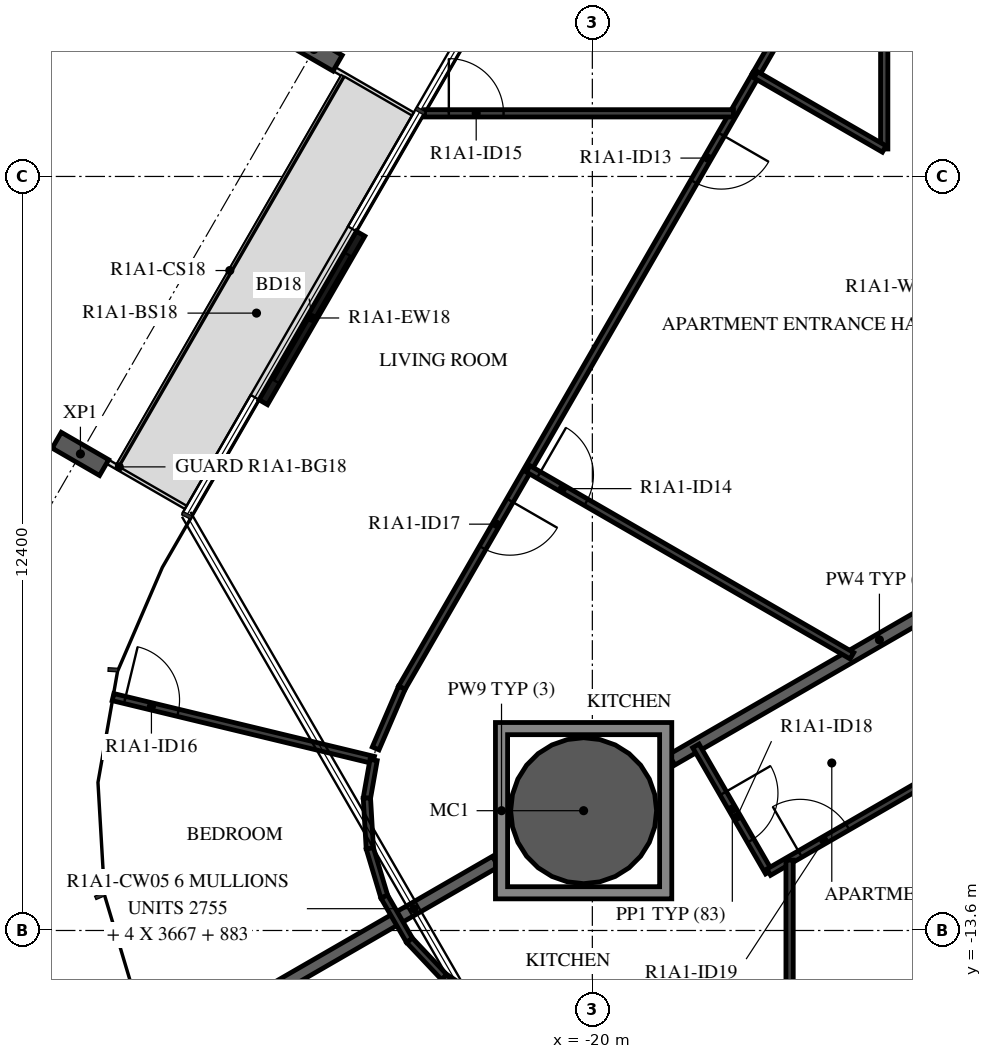
"""IFC4 building model, lengths in metres.
Left out: names, types, materials, properties, quantities, classifications, styles, units other than length and angle.
Written with IfcOpenShell. Run it as: python <this file> out.ifc"""

import sys

from ifc_helpers import new_model, si_unit, direction, frame, frame_2d, origin, origin_2d, place, context, subcontext, project, spatial, polyline, rectangle, hollow_circle, i_section, outline, extrude, element, fill, save


model = new_model("IFC4")
c1 = context("Model", 3, precision=1e-05, world=origin(), true_north=direction((0.0, 1.0)))
c2 = subcontext(c1, "Body", "Model", "MODEL_VIEW")
j1 = project(units=[si_unit("LENGTHUNIT", "METRE"), si_unit("PLANEANGLEUNIT", "RADIAN")], contexts=[c1])
p1 = place(None, origin())
s1 = spatial("IfcSite", under=j1, at=p1, CompositionType="ELEMENT")
p2 = place(p1, origin())
s2 = spatial("IfcBuilding", under=s1, at=p2, CompositionType="ELEMENT")
p3 = place(p2, frame((0.0, 0.0, 41.9)))
s3 = spatial("IfcBuildingStorey", under=s2, at=p3, CompositionType="ELEMENT", Elevation=41.9)
p4 = place(p3, frame((-20.144, -11.63, -0.38), z_axis=(0.0, 0.0, 1.0), x_axis=(1.0, 0.0, 0.0)))
e1 = element("IfcColumn", 1, at=p4, inside=s3, PredefinedType="COLUMN", context=c2, shape_type="SweptSolid", body=[
    extrude(hollow_circle(Radius=1.2, WallThickness=0.06, at=origin_2d()), origin(), (0.0, 0.0, 1.0), 3.5),
])
for number, where, z_axis, x_axis in (
    (2, (-24.579, 0.888, -0.38), (0.0, 0.0, 1.0), (0.5, 0.866, 0.0)),
    (3, (-28.419, -5.763, -0.38), (0.0, 0.0, 1.0), (0.5, 0.866, 0.0)),
):
    element("IfcColumn", number, at=place(p3, frame(where, z_axis=z_axis, x_axis=x_axis)), inside=s3, PredefinedType="COLUMN", context=c2, shape_type="SweptSolid", body=[
        extrude(i_section(OverallWidth=0.3, OverallDepth=0.9, WebThickness=0.019, FlangeThickness=0.035, FilletRadius=0.03, at=origin_2d()), origin(), (0.0, 0.0, 1.0), 3.5),
    ])
p5 = place(p3, frame((-23.811, -2.142, 0.0), z_axis=(0.0, 0.0, 1.0), x_axis=(-0.500028443584, -0.866008981251, 0.0)))
e4 = element("IfcWall", 4, at=p5, inside=s3, PredefinedType="STANDARD", context=c2, shape_type="SweptSolid", body=[
    extrude(rectangle(XDim=3.2, YDim=0.16, at=frame_2d((1.6, 0.0))), origin(), (0.0, 0.0, 1.0), 3.12),
])
p6 = place(p5, frame((0.4, 0.0, 0.0)))
e5 = element("IfcOpeningElement", 5, at=p6, cuts=e4, PredefinedType="OPENING", context=c2, shape_type="SweptSolid", body=[
    extrude(rectangle(XDim=2.4, YDim=2.4, at=frame_2d((1.2, 1.2))), frame((0.0, 0.09, 0.0), z_axis=(0.0, -1.0, 0.0), x_axis=(1.0, 0.0, 0.0)), (0.0, 0.0, 1.0), 0.18),
])
p7 = place(p3, frame((-18.694, -10.793, 0.0), z_axis=(0.0, 0.0, 1.0), x_axis=(0.86603400694, 0.499985098601, 0.0)))
e6 = element("IfcWall", 6, at=p7, inside=s3, PredefinedType="STANDARD", context=c2, shape_type="SweptSolid", body=[
    extrude(rectangle(XDim=7.885, YDim=0.2, at=frame_2d((3.943, 0.0))), origin(), (0.0, 0.0, 1.0), 3.12),
])
p8 = place(p3, frame((-27.025, -15.603, 0.0), z_axis=(0.0, 0.0, 1.0), x_axis=(0.866030653443, 0.499990907215, 0.0)))
e7 = element("IfcWall", 7, at=p8, inside=s3, PredefinedType="STANDARD", context=c2, shape_type="SweptSolid", body=[
    extrude(rectangle(XDim=6.271, YDim=0.2, at=frame_2d((3.136, 0.0))), origin(), (0.0, 0.0, 1.0), 3.12),
])
p9 = place(p3, frame((-13.572, 6.953, 0.0), z_axis=(0.0, 0.0, 1.0), x_axis=(-0.499981332661, -0.866036181109, 0.0)))
e8 = element("IfcWall", 8, at=p9, inside=s3, PredefinedType="PARTITIONING", context=c2, shape_type="SweptSolid", body=[
    extrude(rectangle(XDim=7.483, YDim=0.12, at=frame_2d((3.742, 0.0))), origin(), (0.0, 0.0, 1.0), 3.12),
])
p10 = place(p3, frame((-17.313, 0.472, 0.0), z_axis=(0.0, 0.0, 1.0), x_axis=(-0.499999047218, -0.866025953873, 0.0)))
e9 = element("IfcWall", 9, at=p10, inside=s3, PredefinedType="PARTITIONING", context=c2, shape_type="SweptSolid", body=[
    extrude(rectangle(XDim=11.639, YDim=0.12, at=frame_2d((5.82, 0.0))), origin(), (0.0, 0.0, 1.0), 3.12),
])
p11 = place(p10, frame((1.132, 0.0, 0.0)))
e10 = element("IfcOpeningElement", 10, at=p11, cuts=e9, PredefinedType="OPENING", context=c2, shape_type="SweptSolid", body=[
    extrude(rectangle(XDim=0.9, YDim=2.1, at=frame_2d((0.45, 1.05))), frame((0.0, 0.07, 0.0), z_axis=(0.0, -1.0, 0.0), x_axis=(1.0, 0.0, 0.0)), (0.0, 0.0, 1.0), 0.14),
])
p12 = place(p10, frame((8.083, 0.0, 0.0)))
e11 = element("IfcOpeningElement", 11, at=p12, cuts=e9, PredefinedType="OPENING", context=c2, shape_type="SweptSolid", body=[
    extrude(rectangle(XDim=0.9, YDim=2.1, at=frame_2d((0.45, 1.05))), frame((0.0, 0.07, 0.0), z_axis=(0.0, -1.0, 0.0), x_axis=(1.0, 0.0, 0.0)), (0.0, 0.0, 1.0), 0.14),
])
p13 = place(p3, frame((-15.2, 4.073, 0.0), z_axis=(0.0, 0.0, 1.0), x_axis=(0.0, -1.0, 0.0)))
e12 = element("IfcWall", 12, at=p13, inside=s3, PredefinedType="PARTITIONING", context=c2, shape_type="SweptSolid", body=[
    extrude(rectangle(XDim=4.821, YDim=0.12, at=frame_2d((2.411, 0.0))), origin(), (0.0, 0.0, 1.0), 3.12),
])
p14 = place(p13, frame((1.4, 0.0, 0.0)))
e13 = element("IfcOpeningElement", 13, at=p14, cuts=e12, PredefinedType="OPENING", context=c2, shape_type="SweptSolid", body=[
    extrude(rectangle(XDim=0.8, YDim=2.1, at=frame_2d((0.4, 1.05))), frame((0.0, 0.07, 0.0), z_axis=(0.0, -1.0, 0.0), x_axis=(1.0, 0.0, 0.0)), (0.0, 0.0, 1.0), 0.14),
])
p15 = place(p3, frame((-15.2, -0.748, 0.0), z_axis=(0.0, 0.0, 1.0), x_axis=(-0.866030657337, 0.49999090047, 0.0)))
e14 = element("IfcWall", 14, at=p15, inside=s3, PredefinedType="PARTITIONING", context=c2, shape_type="SweptSolid", body=[
    extrude(rectangle(XDim=2.44, YDim=0.12, at=frame_2d((1.22, 0.0))), origin(), (0.0, 0.0, 1.0), 3.12),
])
p16 = place(p3, frame((-21.055, -6.009, 0.0), z_axis=(0.0, 0.0, 1.0), x_axis=(0.866030172657, -0.49999173998, 0.0)))
e15 = element("IfcWall", 15, at=p16, inside=s3, PredefinedType="PARTITIONING", context=c2, shape_type="SweptSolid", body=[
    extrude(rectangle(XDim=6.147, YDim=0.12, at=frame_2d((3.074, 0.0))), origin(), (0.0, 0.0, 1.0), 3.12),
])
p17 = place(p16, frame((0.2, 0.0, 0.0)))
e16 = element("IfcOpeningElement", 16, at=p17, cuts=e15, PredefinedType="OPENING", context=c2, shape_type="SweptSolid", body=[
    extrude(rectangle(XDim=0.9, YDim=2.1, at=frame_2d((0.45, 1.05))), frame((0.0, 0.07, 0.0), z_axis=(0.0, -1.0, 0.0), x_axis=(1.0, 0.0, 0.0)), (0.0, 0.0, 1.0), 0.14),
])
p18 = place(p3, frame((-22.76, -0.162, 0.0), z_axis=(0.0, 0.0, 1.0), x_axis=(1.0, 0.0, 0.0)))
e17 = element("IfcWall", 17, at=p18, inside=s3, PredefinedType="PARTITIONING", context=c2, shape_type="SweptSolid", body=[
    extrude(rectangle(XDim=5.081, YDim=0.12, at=frame_2d((2.54, 0.0))), origin(), (0.0, 0.0, 1.0), 3.12),
])
p19 = place(p18, frame((0.4, 0.0, 0.0)))
e18 = element("IfcOpeningElement", 18, at=p19, cuts=e17, PredefinedType="OPENING", context=c2, shape_type="SweptSolid", body=[
    extrude(rectangle(XDim=0.9, YDim=2.1, at=frame_2d((0.45, 1.05))), frame((0.0, 0.07, 0.0), z_axis=(0.0, -1.0, 0.0), x_axis=(1.0, 0.0, 0.0)), (0.0, 0.0, 1.0), 0.14),
])
p20 = place(p3, frame((-23.564, -10.606, 0.0), z_axis=(0.0, 0.0, 1.0), x_axis=(0.396195073027, 0.918166359713, 0.0)))
e19 = element("IfcWall", 19, at=p20, inside=s3, PredefinedType="PARTITIONING", context=c2, shape_type="SweptSolid", body=[
    extrude(rectangle(XDim=1.087, YDim=0.12, at=frame_2d((0.543, 0.0))), origin(), (0.0, 0.0, 1.0), 3.12),
])
p21 = place(p3, frame((-27.883, -9.762, 0.0), z_axis=(0.0, 0.0, 1.0), x_axis=(0.972097015458, -0.234579181809, 0.0)))
e20 = element("IfcWall", 20, at=p21, inside=s3, PredefinedType="PARTITIONING", context=c2, shape_type="SweptSolid", body=[
    extrude(rectangle(XDim=4.409, YDim=0.12, at=frame_2d((2.204, 0.0))), origin(), (0.0, 0.0, 1.0), 3.12),
])
p22 = place(p21, frame((0.2, 0.0, 0.0)))
e21 = element("IfcOpeningElement", 21, at=p22, cuts=e20, PredefinedType="OPENING", context=c2, shape_type="SweptSolid", body=[
    extrude(rectangle(XDim=0.9, YDim=2.1, at=frame_2d((0.45, 1.05))), frame((0.0, 0.07, 0.0), z_axis=(0.0, -1.0, 0.0), x_axis=(1.0, 0.0, 0.0)), (0.0, 0.0, 1.0), 0.14),
])
p23 = place(p3, frame((-23.597, -10.796, 0.0), z_axis=(0.0, 0.0, 1.0), x_axis=(-0.173610040386, -0.984814476882, 0.0)))
e22 = element("IfcWall", 22, at=p23, inside=s3, PredefinedType="PARTITIONING", context=c2, shape_type="SweptSolid", body=[
    extrude(rectangle(XDim=0.636, YDim=0.12, at=frame_2d((0.318, 0.0))), origin(), (0.0, 0.0, 1.0), 3.12),
])
p24 = place(p3, frame((-23.708, -11.422, 0.0), z_axis=(0.0, 0.0, 1.0), x_axis=(0.058031280246, -0.998314765248, 0.0)))
e23 = element("IfcWall", 23, at=p24, inside=s3, PredefinedType="PARTITIONING", context=c2, shape_type="SweptSolid", body=[
    extrude(rectangle(XDim=0.829, YDim=0.12, at=frame_2d((0.415, 0.0))), origin(), (0.0, 0.0, 1.0), 3.12),
])
for number, where, z_axis, x_axis in (
    (24, (-23.659, -12.25, 0.0), (0.0, 0.0, 1.0), (0.287, -0.958, 0.0)),
    (25, (-23.422, -13.044, 0.0), (0.0, 0.0, 1.0), (0.5, -0.866, 0.0)),
):
    element("IfcWall", number, at=place(p3, frame(where, z_axis=z_axis, x_axis=x_axis)), inside=s3, PredefinedType="PARTITIONING", context=c2, shape_type="SweptSolid", body=[
        extrude(rectangle(XDim=0.829, YDim=0.12, at=frame_2d((0.415, 0.0))), origin(), (0.0, 0.0, 1.0), 3.12),
    ])
p25 = place(p3, frame((-18.298, -10.564, 0.0), z_axis=(0.0, 0.0, 1.0), x_axis=(0.500048565365, -0.865997362742, 0.0)))
e26 = element("IfcWall", 26, at=p25, inside=s3, PredefinedType="PARTITIONING", context=c2, shape_type="SweptSolid", body=[
    extrude(rectangle(XDim=2.398, YDim=0.12, at=frame_2d((1.199, 0.0))), origin(), (0.0, 0.0, 1.0), 3.12),
])
p26 = place(p25, frame((0.9, 0.0, 0.0)))
e27 = element("IfcOpeningElement", 27, at=p26, cuts=e26, PredefinedType="OPENING", context=c2, shape_type="SweptSolid", body=[
    extrude(rectangle(XDim=0.9, YDim=2.1, at=frame_2d((0.45, 1.05))), frame((0.0, 0.07, 0.0), z_axis=(0.0, -1.0, 0.0), x_axis=(1.0, 0.0, 0.0)), (0.0, 0.0, 1.0), 0.14),
])
p27 = place(p3, frame((-17.099, -12.641, 0.0), z_axis=(0.0, 0.0, 1.0), x_axis=(0.866027165828, 0.499996948039, 0.0)))
e28 = element("IfcWall", 28, at=p27, inside=s3, PredefinedType="PARTITIONING", context=c2, shape_type="SweptSolid", body=[
    extrude(rectangle(XDim=5.928, YDim=0.12, at=frame_2d((2.964, 0.0))), origin(), (0.0, 0.0, 1.0), 3.12),
])
p28 = place(p27, frame((0.595, 0.0, 0.0)))
e29 = element("IfcOpeningElement", 29, at=p28, cuts=e28, PredefinedType="OPENING", context=c2, shape_type="SweptSolid", body=[
    extrude(rectangle(XDim=0.9, YDim=2.1, at=frame_2d((0.45, 1.05))), frame((0.0, 0.07, 0.0), z_axis=(0.0, -1.0, 0.0), x_axis=(1.0, 0.0, 0.0)), (0.0, 0.0, 1.0), 0.14),
])
p29 = place(p3, frame((-21.746, -14.82, 0.0), z_axis=(0.0, 0.0, 1.0), x_axis=(-0.835477570013, 0.549524549046, 0.0)))
e30 = element("IfcWall", 30, at=p29, inside=s3, PredefinedType="PARTITIONING", context=c2, shape_type="SweptSolid", body=[
    extrude(rectangle(XDim=0.829, YDim=0.12, at=frame_2d((0.415, 0.0))), origin(), (0.0, 0.0, 1.0), 3.12),
])
p30 = place(p3, frame((-22.438, -14.365, 0.0), z_axis=(0.0, 0.0, 1.0), x_axis=(-0.686182189596, 0.727429723535, 0.0)))
e31 = element("IfcWall", 31, at=p30, inside=s3, PredefinedType="PARTITIONING", context=c2, shape_type="SweptSolid", body=[
    extrude(rectangle(XDim=0.829, YDim=0.12, at=frame_2d((0.414, 0.0))), origin(), (0.0, 0.0, 1.0), 3.12),
])
p31 = place(p3, frame((-16.756, -15.23, 0.0), z_axis=(0.0, 0.0, 1.0), x_axis=(0.0, 1.0, 0.0)))
e32 = element("IfcWall", 32, at=p31, inside=s3, PredefinedType="PARTITIONING", context=c2, shape_type="SweptSolid", body=[
    extrude(rectangle(XDim=2.787, YDim=0.12, at=frame_2d((1.394, 0.0))), origin(), (0.0, 0.0, 1.0), 3.12),
])
p32 = place(p3, origin())
e33 = element("IfcWall", 33, at=p32, inside=s3, PredefinedType="STANDARD", context=c2, shape_type="SweptSolid", body=[
    extrude(outline(polyline([(-18.694, -10.18), (-18.694, -13.08), (-21.594, -13.08), (-21.594, -10.18), (-18.694, -10.18)]), holes=[polyline([(-21.394, -12.88), (-18.894, -12.88), (-18.894, -10.38), (-21.394, -10.38), (-21.394, -12.88)])]), origin(), (0.0, 0.0, 1.0), 3.12),
])
p33 = place(p6, origin())
e34 = element("IfcDoor", 34, at=p33, inside=s3, OperationType="DOUBLE_DOOR_SLIDING", PredefinedType="DOOR", context=c2, shape_type="SweptSolid", body=[
    extrude(rectangle(XDim=2.4, YDim=2.4, at=frame_2d((1.2, 1.2))), frame((0.0, 0.025, 0.0), z_axis=(0.0, -1.0, 0.0), x_axis=(1.0, 0.0, 0.0)), (0.0, 0.0, 1.0), 0.05),
])
fill(e5, e34)
p34 = place(p11, origin())
e35 = element("IfcDoor", 35, at=p34, inside=s3, OperationType="SINGLE_SWING_RIGHT", PredefinedType="DOOR", context=c2, shape_type="SweptSolid", body=[
    extrude(rectangle(XDim=0.9, YDim=2.1, at=frame_2d((0.45, 1.05))), frame((0.0, 0.025, 0.0), z_axis=(0.0, -1.0, 0.0), x_axis=(1.0, 0.0, 0.0)), (0.0, 0.0, 1.0), 0.05),
])
fill(e10, e35)
p35 = place(p17, origin())
e36 = element("IfcDoor", 36, at=p35, inside=s3, OperationType="SINGLE_SWING_RIGHT", PredefinedType="DOOR", context=c2, shape_type="SweptSolid", body=[
    extrude(rectangle(XDim=0.9, YDim=2.1, at=frame_2d((0.45, 1.05))), frame((0.0, 0.025, 0.0), z_axis=(0.0, -1.0, 0.0), x_axis=(1.0, 0.0, 0.0)), (0.0, 0.0, 1.0), 0.05),
])
fill(e16, e36)
p36 = place(p19, origin())
e37 = element("IfcDoor", 37, at=p36, inside=s3, OperationType="SINGLE_SWING_LEFT", PredefinedType="DOOR", context=c2, shape_type="SweptSolid", body=[
    extrude(rectangle(XDim=0.9, YDim=2.1, at=frame_2d((0.45, 1.05))), frame((0.0, 0.025, 0.0), z_axis=(0.0, -1.0, 0.0), x_axis=(1.0, 0.0, 0.0)), (0.0, 0.0, 1.0), 0.05),
])
fill(e18, e37)
p37 = place(p22, origin())
e38 = element("IfcDoor", 38, at=p37, inside=s3, OperationType="SINGLE_SWING_RIGHT", PredefinedType="DOOR", context=c2, shape_type="SweptSolid", body=[
    extrude(rectangle(XDim=0.9, YDim=2.1, at=frame_2d((0.45, 1.05))), frame((0.0, 0.025, 0.0), z_axis=(0.0, -1.0, 0.0), x_axis=(1.0, 0.0, 0.0)), (0.0, 0.0, 1.0), 0.05),
])
fill(e21, e38)
p38 = place(p12, origin())
e39 = element("IfcDoor", 39, at=p38, inside=s3, OperationType="SINGLE_SWING_LEFT", PredefinedType="DOOR", context=c2, shape_type="SweptSolid", body=[
    extrude(rectangle(XDim=0.9, YDim=2.1, at=frame_2d((0.45, 1.05))), frame((0.0, 0.025, 0.0), z_axis=(0.0, -1.0, 0.0), x_axis=(1.0, 0.0, 0.0)), (0.0, 0.0, 1.0), 0.05),
])
fill(e11, e39)
p39 = place(p26, origin())
e40 = element("IfcDoor", 40, at=p39, inside=s3, OperationType="SINGLE_SWING_LEFT", PredefinedType="DOOR", context=c2, shape_type="SweptSolid", body=[
    extrude(rectangle(XDim=0.9, YDim=2.1, at=frame_2d((0.45, 1.05))), frame((0.0, 0.025, 0.0), z_axis=(0.0, -1.0, 0.0), x_axis=(1.0, 0.0, 0.0)), (0.0, 0.0, 1.0), 0.05),
])
fill(e27, e40)
p40 = place(p28, origin())
e41 = element("IfcDoor", 41, at=p40, inside=s3, OperationType="SINGLE_SWING_LEFT", PredefinedType="DOOR", context=c2, shape_type="SweptSolid", body=[
    extrude(rectangle(XDim=0.9, YDim=2.1, at=frame_2d((0.45, 1.05))), frame((0.0, 0.025, 0.0), z_axis=(0.0, -1.0, 0.0), x_axis=(1.0, 0.0, 0.0)), (0.0, 0.0, 1.0), 0.05),
])
fill(e29, e41)
save(model, sys.argv[1])
